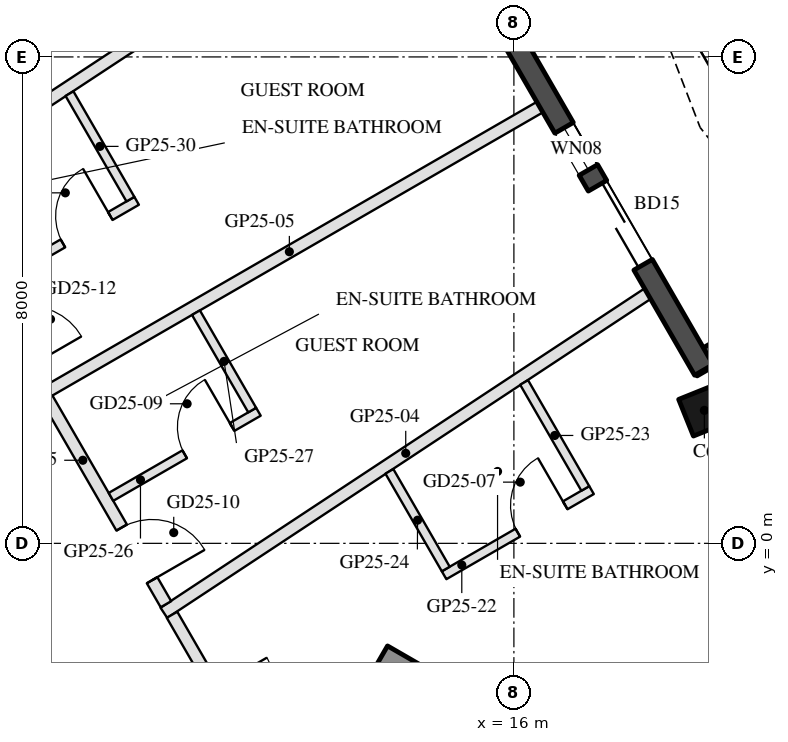
"""IFC4 building model, lengths in metres.
Left out: names, types, materials, properties, quantities, classifications, styles, units other than length and angle.
Written with IfcOpenShell. Run it as: python <this file> out.ifc"""

import sys

from ifc_helpers import new_model, si_unit, direction, frame, frame_2d, origin, origin_2d, place, context, subcontext, project, spatial, rectangle, hollow_rectangle, extrude, boolean, halfspace, element, fill, save


model = new_model("IFC4")
c1 = context("Model", 3, precision=1e-05, world=origin(), true_north=direction((0.0, 1.0)))
c2 = subcontext(c1, "Body", "Model", "MODEL_VIEW")
j1 = project(units=[si_unit("LENGTHUNIT", "METRE"), si_unit("PLANEANGLEUNIT", "RADIAN")], contexts=[c1])
p1 = place(None, origin())
s1 = spatial("IfcSite", under=j1, at=p1, CompositionType="ELEMENT")
p2 = place(p1, origin())
s2 = spatial("IfcBuilding", under=s1, at=p2, CompositionType="ELEMENT")
p3 = place(p2, frame((0.0, 0.0, 265.2)))
s3 = spatial("IfcBuildingStorey", under=s2, at=p3, CompositionType="ELEMENT", Elevation=265.2)
p4 = place(p3, frame((19.132, 2.188, 0.0), z_axis=(-0.161388519526, -0.022915997932, 0.986624854139), x_axis=(0.495109873729, -0.866696335889, 0.060857820306)))
e1 = element("IfcColumn", 1, at=p4, inside=s3, PredefinedType="COLUMN", context=c2, shape_type="SweptSolid", body=[
    boolean("DIFFERENCE", boolean("DIFFERENCE", extrude(hollow_rectangle(XDim=0.65, YDim=0.65, WallThickness=0.03, at=origin_2d()), origin(), (0.0, 0.0, 1.0), 3.75), halfspace(frame((0.0, 0.0, 0.04), z_axis=(0.0, 0.0, 1.0), x_axis=(1.0, 0.0, 0.0)), True)), halfspace(frame((0.0, 0.0, 3.71), z_axis=(0.0, 0.0, 1.0), x_axis=(1.0, 0.0, 0.0)), False)),
])
p5 = place(p3, frame((19.982, 3.515, 0.0), z_axis=(0.0, 0.0, 1.0), x_axis=(-0.866092288191, -0.499884134912, 0.0)))
e2 = element("IfcWall", 2, at=p5, inside=s3, PredefinedType="SOLIDWALL", context=c2, shape_type="SweptSolid", body=[
    extrude(rectangle(XDim=1.22, YDim=0.35, at=frame_2d((0.61, 0.0))), origin(), (0.0, 0.0, 1.0), 3.55),
])
p6 = place(p3, frame((19.124, 2.852, 0.0), z_axis=(0.0, 0.0, 1.0), x_axis=(-0.499993986225, 0.866028875811, 0.0)))
e3 = element("IfcWall", 3, at=p6, inside=s3, PredefinedType="SOLIDWALL", context=c2, shape_type="SweptSolid", body=[
    extrude(rectangle(XDim=6.512, YDim=0.35, at=frame_2d((3.256, 0.0))), origin(), (0.0, 0.0, 1.0), 3.55),
])
p7 = place(p6, frame((1.997, 0.0, 0.0)))
e4 = element("IfcOpeningElement", 4, at=p7, cuts=e3, PredefinedType="OPENING", context=c2, shape_type="SweptSolid", body=[
    extrude(rectangle(XDim=1.5, YDim=2.4, at=frame_2d((0.75, 1.2))), frame((0.0, 0.185, 0.0), z_axis=(0.0, -1.0, 0.0), x_axis=(1.0, 0.0, 0.0)), (0.0, 0.0, 1.0), 0.37),
])
p8 = place(p6, frame((3.797, 0.0, 0.3)))
e5 = element("IfcOpeningElement", 5, at=p8, cuts=e3, PredefinedType="OPENING", context=c2, shape_type="SweptSolid", body=[
    extrude(rectangle(XDim=0.8, YDim=2.65, at=frame_2d((0.4, 1.325))), frame((0.0, 0.185, 0.0), z_axis=(0.0, -1.0, 0.0), x_axis=(1.0, 0.0, 0.0)), (0.0, 0.0, 1.0), 0.37),
])
p9 = place(p3, frame((13.797, -1.903, 0.0), z_axis=(0.0, 0.0, 1.0), x_axis=(0.86602744543, -0.49999646375, 0.0)))
e6 = element("IfcWall", 6, at=p9, inside=s3, PredefinedType="SHEAR", context=c2, shape_type="SweptSolid", body=[
    extrude(rectangle(XDim=13.934, YDim=0.5, at=frame_2d((6.967, 0.0))), origin(), (0.0, 0.0, 1.0), 3.5),
])
p10 = place(p3, frame((18.198, 4.105, 0.0), z_axis=(0.0, 0.0, 1.0), x_axis=(-0.83467370746, -0.550744770356, 0.0)))
e7 = element("IfcWall", 7, at=p10, inside=s3, PredefinedType="PARTITIONING", context=c2, shape_type="SweptSolid", body=[
    extrude(rectangle(XDim=9.53, YDim=0.2, at=frame_2d((4.765, 0.0))), origin(), (0.0, 0.0, 1.0), 3.1),
])
p11 = place(p3, frame((16.427, 7.174, 0.0), z_axis=(0.0, 0.0, 1.0), x_axis=(-0.866033014143, -0.499986818241, 0.0)))
e8 = element("IfcWall", 8, at=p11, inside=s3, PredefinedType="PARTITIONING", context=c2, shape_type="SweptSolid", body=[
    extrude(rectangle(XDim=9.513, YDim=0.2, at=frame_2d((4.756, 0.0))), origin(), (0.0, 0.0, 1.0), 3.1),
])
p12 = place(p3, frame((14.906, 11.608, 0.0), z_axis=(0.0, 0.0, 1.0), x_axis=(-0.835212554653, -0.549927257507, 0.0)))
e9 = element("IfcWall", 9, at=p12, inside=s3, PredefinedType="PARTITIONING", context=c2, shape_type="SweptSolid", body=[
    extrude(rectangle(XDim=10.431, YDim=0.2, at=frame_2d((5.216, 0.0))), origin(), (0.0, 0.0, 1.0), 3.1),
])
p13 = place(p3, frame((10.378, -1.175, 0.0), z_axis=(0.0, 0.0, 1.0), x_axis=(0.50004096614, -0.86600175068, 0.0)))
e10 = element("IfcWall", 10, at=p13, inside=s3, PredefinedType="PARTITIONING", context=c2, shape_type="SweptSolid", body=[
    extrude(rectangle(XDim=3.782, YDim=0.2, at=frame_2d((1.891, 0.0))), origin(), (0.0, 0.0, 1.0), 3.0),
])
p14 = place(p13, frame((1.391, 0.0, 0.0)))
e11 = element("IfcOpeningElement", 11, at=p14, cuts=e10, PredefinedType="OPENING", context=c2, shape_type="SweptSolid", body=[
    extrude(rectangle(XDim=1.0, YDim=2.1, at=frame_2d((0.5, 1.05))), frame((0.0, 0.11, 0.0), z_axis=(0.0, -1.0, 0.0), x_axis=(1.0, 0.0, 0.0)), (0.0, 0.0, 1.0), 0.22),
])
p15 = place(p3, frame((14.852, -0.524, 0.0), z_axis=(0.0, 0.0, 1.0), x_axis=(0.866034573852, 0.49998411664, 0.0)))
e12 = element("IfcWall", 12, at=p15, inside=s3, PredefinedType="PARTITIONING", context=c2, shape_type="SweptSolid", body=[
    extrude(rectangle(XDim=2.8, YDim=0.15, at=frame_2d((1.4, 0.0))), origin(), (0.0, 0.0, 1.0), 3.55),
])
p16 = place(p15, frame((1.4, 0.0, 0.0)))
e13 = element("IfcOpeningElement", 13, at=p16, cuts=e12, PredefinedType="OPENING", context=c2, shape_type="SweptSolid", body=[
    extrude(rectangle(XDim=0.9, YDim=2.1, at=frame_2d((0.45, 1.05))), frame((0.0, 0.085, 0.0), z_axis=(0.0, -1.0, 0.0), x_axis=(1.0, 0.0, 0.0)), (0.0, 0.0, 1.0), 0.17),
])
p17 = place(p3, frame((17.175, 0.903, 0.0), z_axis=(0.0, 0.0, 1.0), x_axis=(-0.499974444137, 0.866040157966, 0.0)))
e14 = element("IfcWall", 14, at=p17, inside=s3, PredefinedType="PARTITIONING", context=c2, shape_type="SweptSolid", body=[
    extrude(rectangle(XDim=2.013, YDim=0.15, at=frame_2d((1.006, 0.0))), origin(), (0.0, 0.0, 1.0), 3.0),
])
p18 = place(p3, frame((14.879, -0.422, 0.0), z_axis=(0.0, 0.0, 1.0), x_axis=(-0.499920006315, 0.866071583234, 0.0)))
e15 = element("IfcWall", 15, at=p18, inside=s3, PredefinedType="PARTITIONING", context=c2, shape_type="SweptSolid", body=[
    extrude(rectangle(XDim=1.854, YDim=0.15, at=frame_2d((0.927, 0.0))), origin(), (0.0, 0.0, 1.0), 3.0),
])
p19 = place(p3, frame((8.325, 2.381, 0.0), z_axis=(0.0, 0.0, 1.0), x_axis=(0.499991187483, -0.866030491634, 0.0)))
e16 = element("IfcWall", 16, at=p19, inside=s3, PredefinedType="PARTITIONING", context=c2, shape_type="SweptSolid", body=[
    extrude(rectangle(XDim=3.906, YDim=0.2, at=frame_2d((1.953, 0.0))), origin(), (0.0, 0.0, 1.0), 3.0),
])
p20 = place(p19, frame((2.45, 0.0, 0.0)))
e17 = element("IfcOpeningElement", 17, at=p20, cuts=e16, PredefinedType="OPENING", context=c2, shape_type="SweptSolid", body=[
    extrude(rectangle(XDim=1.0, YDim=2.1, at=frame_2d((0.5, 1.05))), frame((0.0, 0.11, 0.0), z_axis=(0.0, -1.0, 0.0), x_axis=(1.0, 0.0, 0.0)), (0.0, 0.0, 1.0), 0.22),
])
p21 = place(p3, frame((9.374, 0.764, 0.0), z_axis=(0.0, 0.0, 1.0), x_axis=(0.865996816683, 0.500049511043, 0.0)))
e18 = element("IfcWall", 18, at=p21, inside=s3, PredefinedType="PARTITIONING", context=c2, shape_type="SweptSolid", body=[
    extrude(rectangle(XDim=2.8, YDim=0.15, at=frame_2d((1.4, 0.0))), origin(), (0.0, 0.0, 1.0), 3.55),
])
p22 = place(p21, frame((1.4, 0.0, 0.0)))
e19 = element("IfcOpeningElement", 19, at=p22, cuts=e18, PredefinedType="OPENING", context=c2, shape_type="SweptSolid", body=[
    extrude(rectangle(XDim=0.9, YDim=2.1, at=frame_2d((0.45, 1.05))), frame((0.0, 0.085, 0.0), z_axis=(0.0, -1.0, 0.0), x_axis=(1.0, 0.0, 0.0)), (0.0, 0.0, 1.0), 0.17),
])
p23 = place(p3, frame((11.696, 2.192, 0.0), z_axis=(0.0, 0.0, 1.0), x_axis=(-0.500042316284, 0.866000971088, 0.0)))
e20 = element("IfcWall", 20, at=p23, inside=s3, PredefinedType="PARTITIONING", context=c2, shape_type="SweptSolid", body=[
    extrude(rectangle(XDim=1.85, YDim=0.15, at=frame_2d((0.925, 0.0))), origin(), (0.0, 0.0, 1.0), 3.0),
])
p24 = place(p3, frame((7.371, 4.233, 0.0), z_axis=(0.0, 0.0, 1.0), x_axis=(0.866034573852, 0.49998411664, 0.0)))
e21 = element("IfcWall", 21, at=p24, inside=s3, PredefinedType="PARTITIONING", context=c2, shape_type="SweptSolid", body=[
    extrude(rectangle(XDim=2.8, YDim=0.15, at=frame_2d((1.4, 0.0))), origin(), (0.0, 0.0, 1.0), 3.0),
])
p25 = place(p24, frame((1.4, 0.0, 0.0)))
e22 = element("IfcOpeningElement", 22, at=p25, cuts=e21, PredefinedType="OPENING", context=c2, shape_type="SweptSolid", body=[
    extrude(rectangle(XDim=0.9, YDim=2.1, at=frame_2d((0.45, 1.05))), frame((0.0, 0.085, 0.0), z_axis=(0.0, -1.0, 0.0), x_axis=(1.0, 0.0, 0.0)), (0.0, 0.0, 1.0), 0.17),
])
p26 = place(p3, frame((9.693, 5.661, 0.0), z_axis=(0.0, 0.0, 1.0), x_axis=(-0.499964999879, 0.866045610171, 0.0)))
e23 = element("IfcWall", 23, at=p26, inside=s3, PredefinedType="PARTITIONING", context=c2, shape_type="SweptSolid", body=[
    extrude(rectangle(XDim=2.004, YDim=0.15, at=frame_2d((1.002, 0.0))), origin(), (0.0, 0.0, 1.0), 3.0),
])
p27 = place(p3, frame((14.336, 12.595, 0.0), z_axis=(0.0, 0.0, 1.0), x_axis=(-0.880794466183, -0.473498794445, 0.0)))
e24 = element("IfcWall", 24, at=p27, inside=s3, PredefinedType="PARTITIONING", context=c2, shape_type="SweptSolid", body=[
    extrude(rectangle(XDim=10.418, YDim=0.15, at=frame_2d((5.209, 0.0))), origin(), (0.0, 0.0, 1.0), 3.0),
])
p28 = place(p7, frame((1.5, 0.0, 0.0), z_axis=(0.0, 0.0, 1.0), x_axis=(-1.0, 0.0, 0.0)))
e25 = element("IfcDoor", 25, at=p28, inside=s3, OperationType="SLIDING_TO_LEFT", PredefinedType="DOOR", context=c2, shape_type="SweptSolid", body=[
    extrude(rectangle(XDim=1.5, YDim=2.4, at=frame_2d((0.75, 1.2))), frame((0.0, 0.025, 0.0), z_axis=(0.0, -1.0, 0.0), x_axis=(1.0, 0.0, 0.0)), (0.0, 0.0, 1.0), 0.05),
])
fill(e4, e25)
p29 = place(p8, origin())
e26 = element("IfcWindow", 26, at=p29, inside=s3, PartitioningType="SINGLE_PANEL", PredefinedType="WINDOW", context=c2, shape_type="SweptSolid", body=[
    extrude(rectangle(XDim=0.8, YDim=2.65, at=frame_2d((0.4, 1.325))), frame((0.0, 0.03, 0.0), z_axis=(0.0, -1.0, 0.0), x_axis=(1.0, 0.0, 0.0)), (0.0, 0.0, 1.0), 0.06),
])
fill(e5, e26)
p30 = place(p16, origin())
e27 = element("IfcDoor", 27, at=p30, inside=s3, OperationType="SINGLE_SWING_RIGHT", PredefinedType="DOOR", context=c2, shape_type="SweptSolid", body=[
    extrude(rectangle(XDim=0.9, YDim=2.1, at=frame_2d((0.45, 1.05))), frame((0.0, 0.025, 0.0), z_axis=(0.0, -1.0, 0.0), x_axis=(1.0, 0.0, 0.0)), (0.0, 0.0, 1.0), 0.05),
])
fill(e13, e27)
p31 = place(p22, origin())
e28 = element("IfcDoor", 28, at=p31, inside=s3, OperationType="SINGLE_SWING_RIGHT", PredefinedType="DOOR", context=c2, shape_type="SweptSolid", body=[
    extrude(rectangle(XDim=0.9, YDim=2.1, at=frame_2d((0.45, 1.05))), frame((0.0, 0.025, 0.0), z_axis=(0.0, -1.0, 0.0), x_axis=(1.0, 0.0, 0.0)), (0.0, 0.0, 1.0), 0.05),
])
fill(e19, e28)
p32 = place(p20, origin())
e29 = element("IfcDoor", 29, at=p32, inside=s3, OperationType="SINGLE_SWING_RIGHT", PredefinedType="DOOR", context=c2, shape_type="SweptSolid", body=[
    extrude(rectangle(XDim=1.0, YDim=2.1, at=frame_2d((0.5, 1.05))), frame((0.0, 0.025, 0.0), z_axis=(0.0, -1.0, 0.0), x_axis=(1.0, 0.0, 0.0)), (0.0, 0.0, 1.0), 0.05),
])
fill(e17, e29)
p33 = place(p25, origin())
e30 = element("IfcDoor", 30, at=p33, inside=s3, OperationType="SINGLE_SWING_RIGHT", PredefinedType="DOOR", context=c2, shape_type="SweptSolid", body=[
    extrude(rectangle(XDim=0.9, YDim=2.1, at=frame_2d((0.45, 1.05))), frame((0.0, 0.025, 0.0), z_axis=(0.0, -1.0, 0.0), x_axis=(1.0, 0.0, 0.0)), (0.0, 0.0, 1.0), 0.05),
])
fill(e22, e30)
save(model, sys.argv[1])
